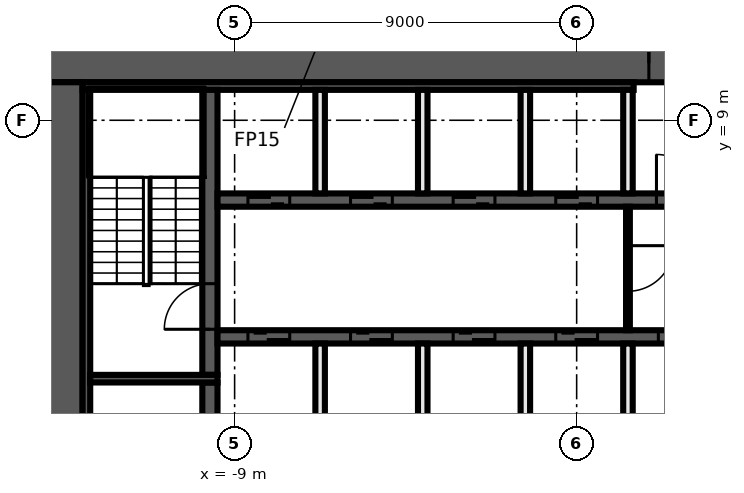
"""IFC4 building model, lengths in metres.
Left out: names, types, materials, properties, quantities, classifications, styles, units other than length and angle.
Written with IfcOpenShell. Run it as: python <this file> out.ifc"""

import sys

from ifc_helpers import new_model, si_unit, direction, frame, frame_2d, origin, place, context, subcontext, project, spatial, rectangle, extrude, element, fill, save


model = new_model("IFC4")
c1 = context("Model", 3, precision=1e-05, world=origin(), true_north=direction((0.0, 1.0)))
c2 = subcontext(c1, "Body", "Model", "MODEL_VIEW")
j1 = project(units=[si_unit("LENGTHUNIT", "METRE"), si_unit("PLANEANGLEUNIT", "RADIAN")], contexts=[c1])
p1 = place(None, origin())
s1 = spatial("IfcSite", under=j1, at=p1, CompositionType="ELEMENT")
p2 = place(p1, origin())
s2 = spatial("IfcBuilding", under=s1, at=p2, CompositionType="ELEMENT")
p3 = place(p2, frame((0.0, 0.0, 113.7)))
s3 = spatial("IfcBuildingStorey", under=s2, at=p3, CompositionType="ELEMENT", Elevation=113.7)
p4 = place(p3, frame((-14.0, 10.5, 0.0), z_axis=(0.0, 0.0, 1.0), x_axis=(1.0, 0.0, 0.0)))
e1 = element("IfcWall", 1, at=p4, inside=s3, PredefinedType="SHEAR", context=c2, shape_type="SweptSolid", body=[
    extrude(rectangle(XDim=28.0, YDim=1.0, at=frame_2d((14.0, 0.0))), origin(), (0.0, 0.0, 1.0), 3.3),
])
p5 = place(p4, frame((15.9, 0.0, 0.0)))
e2 = element("IfcOpeningElement", 2, at=p5, cuts=e1, PredefinedType="OPENING", context=c2, shape_type="SweptSolid", body=[
    extrude(rectangle(XDim=1.6, YDim=2.1, at=frame_2d((0.8, 1.05))), frame((0.0, 0.51, 0.0), z_axis=(0.0, -1.0, 0.0), x_axis=(1.0, 0.0, 0.0)), (0.0, 0.0, 1.0), 1.02),
])
p6 = place(p3, frame((-13.5, -10.0, 0.0), z_axis=(0.0, 0.0, 1.0), x_axis=(0.0, 1.0, 0.0)))
e3 = element("IfcWall", 3, at=p6, inside=s3, PredefinedType="SHEAR", context=c2, shape_type="SweptSolid", body=[
    extrude(rectangle(XDim=20.0, YDim=1.0, at=frame_2d((10.0, 0.0))), origin(), (0.0, 0.0, 1.0), 3.3),
])
p7 = place(p3, frame((-13.0, 9.9, 0.0), z_axis=(0.0, 0.0, 1.0), x_axis=(1.0, 0.0, 0.0)))
e4 = element("IfcWall", 4, at=p7, inside=s3, PredefinedType="SHEAR", context=c2, shape_type="SweptSolid", body=[
    extrude(rectangle(XDim=14.5, YDim=0.2, at=frame_2d((7.25, 0.0))), origin(), (0.0, 0.0, 1.0), 3.3),
])
p8 = place(p3, frame((-12.9, -9.8, 0.0), z_axis=(0.0, 0.0, 1.0), x_axis=(0.0, 1.0, 0.0)))
e5 = element("IfcWall", 5, at=p8, inside=s3, PredefinedType="SHEAR", context=c2, shape_type="SweptSolid", body=[
    extrude(rectangle(XDim=19.6, YDim=0.2, at=frame_2d((9.8, 0.0))), origin(), (0.0, 0.0, 1.0), 3.3),
])
p9 = place(p3, frame((-9.65, -2.1, 0.0), z_axis=(0.0, 0.0, 1.0), x_axis=(0.0, 1.0, 0.0)))
e6 = element("IfcWall", 6, at=p9, inside=s3, PredefinedType="SHEAR", context=c2, shape_type="SweptSolid", body=[
    extrude(rectangle(XDim=4.2, YDim=0.4, at=frame_2d((2.1, 0.0))), origin(), (0.0, 0.0, 1.0), 3.3),
])
p10 = place(p3, frame((-9.65, 2.3, 0.0), z_axis=(0.0, 0.0, 1.0), x_axis=(0.0, 1.0, 0.0)))
e7 = element("IfcWall", 7, at=p10, inside=s3, PredefinedType="SHEAR", context=c2, shape_type="SweptSolid", body=[
    extrude(rectangle(XDim=7.5, YDim=0.4, at=frame_2d((3.75, 0.0))), origin(), (0.0, 0.0, 1.0), 3.3),
])
p11 = place(p10, frame((1.2, 0.0, 0.0)))
e8 = element("IfcOpeningElement", 8, at=p11, cuts=e7, PredefinedType="OPENING", context=c2, shape_type="SweptSolid", body=[
    extrude(rectangle(XDim=1.2, YDim=2.1, at=frame_2d((0.6, 1.05))), frame((0.0, 0.21, 0.0), z_axis=(0.0, -1.0, 0.0), x_axis=(1.0, 0.0, 0.0)), (0.0, 0.0, 1.0), 0.42),
])
p12 = place(p3, frame((-9.45, 2.2, 0.0), z_axis=(0.0, 0.0, 1.0), x_axis=(-1.0, 0.0, 0.0)))
e9 = element("IfcWall", 9, at=p12, inside=s3, PredefinedType="SHEAR", context=c2, shape_type="SweptSolid", body=[
    extrude(rectangle(XDim=3.35, YDim=0.2, at=frame_2d((1.675, 0.0))), origin(), (0.0, 0.0, 1.0), 3.3),
])
p13 = place(p3, frame((-9.45, 6.9, 0.0), z_axis=(0.0, 0.0, 1.0), x_axis=(1.0, 0.0, 0.0)))
e10 = element("IfcWall", 10, at=p13, inside=s3, PredefinedType="SHEAR", context=c2, shape_type="SweptSolid", body=[
    extrude(rectangle(XDim=18.9, YDim=0.35, at=frame_2d((9.45, 0.0))), origin(), (0.0, 0.0, 1.0), 3.3),
])
p14 = place(p13, frame((0.8, 0.0, 0.0)))
e11 = element("IfcOpeningElement", 11, at=p14, cuts=e10, PredefinedType="OPENING", context=c2, shape_type="SweptSolid", body=[
    extrude(rectangle(XDim=1.1, YDim=2.1, at=frame_2d((0.55, 1.05))), frame((0.0, 0.185, 0.0), z_axis=(0.0, -1.0, 0.0), x_axis=(1.0, 0.0, 0.0)), (0.0, 0.0, 1.0), 0.37),
])
p15 = place(p13, frame((3.5, 0.0, 0.0)))
e12 = element("IfcOpeningElement", 12, at=p15, cuts=e10, PredefinedType="OPENING", context=c2, shape_type="SweptSolid", body=[
    extrude(rectangle(XDim=1.1, YDim=2.1, at=frame_2d((0.55, 1.05))), frame((0.0, 0.185, 0.0), z_axis=(0.0, -1.0, 0.0), x_axis=(1.0, 0.0, 0.0)), (0.0, 0.0, 1.0), 0.37),
])
p16 = place(p13, frame((6.2, 0.0, 0.0)))
e13 = element("IfcOpeningElement", 13, at=p16, cuts=e10, PredefinedType="OPENING", context=c2, shape_type="SweptSolid", body=[
    extrude(rectangle(XDim=1.1, YDim=2.1, at=frame_2d((0.55, 1.05))), frame((0.0, 0.185, 0.0), z_axis=(0.0, -1.0, 0.0), x_axis=(1.0, 0.0, 0.0)), (0.0, 0.0, 1.0), 0.37),
])
p17 = place(p13, frame((8.9, 0.0, 0.0)))
e14 = element("IfcOpeningElement", 14, at=p17, cuts=e10, PredefinedType="OPENING", context=c2, shape_type="SweptSolid", body=[
    extrude(rectangle(XDim=1.1, YDim=2.1, at=frame_2d((0.55, 1.05))), frame((0.0, 0.185, 0.0), z_axis=(0.0, -1.0, 0.0), x_axis=(1.0, 0.0, 0.0)), (0.0, 0.0, 1.0), 0.37),
])
p18 = place(p13, frame((11.55, 0.0, 0.0)))
e15 = element("IfcOpeningElement", 15, at=p18, cuts=e10, PredefinedType="OPENING", context=c2, shape_type="SweptSolid", body=[
    extrude(rectangle(XDim=1.2, YDim=2.1, at=frame_2d((0.6, 1.05))), frame((0.0, 0.185, 0.0), z_axis=(0.0, -1.0, 0.0), x_axis=(1.0, 0.0, 0.0)), (0.0, 0.0, 1.0), 0.37),
])
p19 = place(p13, frame((14.3, 0.0, 0.0)))
e16 = element("IfcOpeningElement", 16, at=p19, cuts=e10, PredefinedType="OPENING", context=c2, shape_type="SweptSolid", body=[
    extrude(rectangle(XDim=1.1, YDim=2.1, at=frame_2d((0.55, 1.05))), frame((0.0, 0.185, 0.0), z_axis=(0.0, -1.0, 0.0), x_axis=(1.0, 0.0, 0.0)), (0.0, 0.0, 1.0), 0.37),
])
p20 = place(p13, frame((17.0, 0.0, 0.0)))
e17 = element("IfcOpeningElement", 17, at=p20, cuts=e10, PredefinedType="OPENING", context=c2, shape_type="SweptSolid", body=[
    extrude(rectangle(XDim=1.1, YDim=2.1, at=frame_2d((0.55, 1.05))), frame((0.0, 0.185, 0.0), z_axis=(0.0, -1.0, 0.0), x_axis=(1.0, 0.0, 0.0)), (0.0, 0.0, 1.0), 0.37),
])
p21 = place(p3, frame((9.45, 3.3, 0.0), z_axis=(0.0, 0.0, 1.0), x_axis=(-1.0, 0.0, 0.0)))
e18 = element("IfcWall", 18, at=p21, inside=s3, PredefinedType="SHEAR", context=c2, shape_type="SweptSolid", body=[
    extrude(rectangle(XDim=18.9, YDim=0.35, at=frame_2d((9.45, 0.0))), origin(), (0.0, 0.0, 1.0), 3.3),
])
p22 = place(p21, frame((17.0, 0.0, 0.0)))
e19 = element("IfcOpeningElement", 19, at=p22, cuts=e18, PredefinedType="OPENING", context=c2, shape_type="SweptSolid", body=[
    extrude(rectangle(XDim=1.1, YDim=2.1, at=frame_2d((0.55, 1.05))), frame((0.0, 0.185, 0.0), z_axis=(0.0, -1.0, 0.0), x_axis=(1.0, 0.0, 0.0)), (0.0, 0.0, 1.0), 0.37),
])
p23 = place(p21, frame((14.3, 0.0, 0.0)))
e20 = element("IfcOpeningElement", 20, at=p23, cuts=e18, PredefinedType="OPENING", context=c2, shape_type="SweptSolid", body=[
    extrude(rectangle(XDim=1.1, YDim=2.1, at=frame_2d((0.55, 1.05))), frame((0.0, 0.185, 0.0), z_axis=(0.0, -1.0, 0.0), x_axis=(1.0, 0.0, 0.0)), (0.0, 0.0, 1.0), 0.37),
])
p24 = place(p21, frame((11.6, 0.0, 0.0)))
e21 = element("IfcOpeningElement", 21, at=p24, cuts=e18, PredefinedType="OPENING", context=c2, shape_type="SweptSolid", body=[
    extrude(rectangle(XDim=1.1, YDim=2.1, at=frame_2d((0.55, 1.05))), frame((0.0, 0.185, 0.0), z_axis=(0.0, -1.0, 0.0), x_axis=(1.0, 0.0, 0.0)), (0.0, 0.0, 1.0), 0.37),
])
p25 = place(p21, frame((8.9, 0.0, 0.0)))
e22 = element("IfcOpeningElement", 22, at=p25, cuts=e18, PredefinedType="OPENING", context=c2, shape_type="SweptSolid", body=[
    extrude(rectangle(XDim=1.1, YDim=2.1, at=frame_2d((0.55, 1.05))), frame((0.0, 0.185, 0.0), z_axis=(0.0, -1.0, 0.0), x_axis=(1.0, 0.0, 0.0)), (0.0, 0.0, 1.0), 0.37),
])
p26 = place(p21, frame((6.2, 0.0, 0.0)))
e23 = element("IfcOpeningElement", 23, at=p26, cuts=e18, PredefinedType="OPENING", context=c2, shape_type="SweptSolid", body=[
    extrude(rectangle(XDim=1.1, YDim=2.1, at=frame_2d((0.55, 1.05))), frame((0.0, 0.185, 0.0), z_axis=(0.0, -1.0, 0.0), x_axis=(1.0, 0.0, 0.0)), (0.0, 0.0, 1.0), 0.37),
])
p27 = place(p21, frame((3.5, 0.0, 0.0)))
e24 = element("IfcOpeningElement", 24, at=p27, cuts=e18, PredefinedType="OPENING", context=c2, shape_type="SweptSolid", body=[
    extrude(rectangle(XDim=1.1, YDim=2.1, at=frame_2d((0.55, 1.05))), frame((0.0, 0.185, 0.0), z_axis=(0.0, -1.0, 0.0), x_axis=(1.0, 0.0, 0.0)), (0.0, 0.0, 1.0), 0.37),
])
p28 = place(p21, frame((0.9, 0.0, 0.0)))
e25 = element("IfcOpeningElement", 25, at=p28, cuts=e18, PredefinedType="OPENING", context=c2, shape_type="SweptSolid", body=[
    extrude(rectangle(XDim=0.9, YDim=2.1, at=frame_2d((0.45, 1.05))), frame((0.0, 0.185, 0.0), z_axis=(0.0, -1.0, 0.0), x_axis=(1.0, 0.0, 0.0)), (0.0, 0.0, 1.0), 0.37),
])
p29 = place(p3, frame((1.35, 6.725, 0.0), z_axis=(0.0, 0.0, 1.0), x_axis=(0.0, -1.0, 0.0)))
e26 = element("IfcWall", 26, at=p29, inside=s3, PredefinedType="PARTITIONING", context=c2, shape_type="SweptSolid", body=[
    extrude(rectangle(XDim=3.25, YDim=0.1, at=frame_2d((1.625, 0.0))), origin(), (0.0, 0.0, 1.0), 3.3),
])
p30 = place(p29, frame((1.025, 0.0, 0.0)))
e27 = element("IfcOpeningElement", 27, at=p30, cuts=e26, PredefinedType="OPENING", context=c2, shape_type="SweptSolid", body=[
    extrude(rectangle(XDim=1.2, YDim=2.1, at=frame_2d((0.6, 1.05))), frame((0.0, 0.06, 0.0), z_axis=(0.0, -1.0, 0.0), x_axis=(1.0, 0.0, 0.0)), (0.0, 0.0, 1.0), 0.12),
])
for number, where, z_axis, x_axis in (
    (28, (1.35, 0.4, 0.0), (0.0, 0.0, 1.0), (0.0, 1.0, 0.0)),
    (29, (1.35, 7.075, 0.0), (0.0, 0.0, 1.0), (0.0, 1.0, 0.0)),
    (30, (-1.35, 0.4, 0.0), (0.0, 0.0, 1.0), (0.0, 1.0, 0.0)),
    (31, (-1.35, 7.075, 0.0), (0.0, 0.0, 1.0), (0.0, 1.0, 0.0)),
    (32, (-4.05, 0.4, 0.0), (0.0, 0.0, 1.0), (0.0, 1.0, 0.0)),
    (33, (-4.05, 7.075, 0.0), (0.0, 0.0, 1.0), (0.0, 1.0, 0.0)),
    (34, (-6.75, 0.4, 0.0), (0.0, 0.0, 1.0), (0.0, 1.0, 0.0)),
    (35, (-6.75, 7.075, 0.0), (0.0, 0.0, 1.0), (0.0, 1.0, 0.0)),
):
    element("IfcWall", number, at=place(p3, frame(where, z_axis=z_axis, x_axis=x_axis)), inside=s3, PredefinedType="SOLIDWALL", context=c2, shape_type="SweptSolid", body=[
        extrude(rectangle(XDim=2.725, YDim=0.25, at=frame_2d((1.363, 0.0))), origin(), (0.0, 0.0, 1.0), 3.3),
    ])
p31 = place(p14, origin())
e36 = element("IfcDoor", 36, at=p31, inside=s3, OperationType="DOUBLE_DOOR_SLIDING", PredefinedType="DOOR", context=c2, shape_type="SweptSolid", body=[
    extrude(rectangle(XDim=1.1, YDim=2.1, at=frame_2d((0.55, 1.05))), frame((0.0, 0.025, 0.0), z_axis=(0.0, -1.0, 0.0), x_axis=(1.0, 0.0, 0.0)), (0.0, 0.0, 1.0), 0.05),
])
fill(e11, e36)
p32 = place(p15, origin())
e37 = element("IfcDoor", 37, at=p32, inside=s3, OperationType="DOUBLE_DOOR_SLIDING", PredefinedType="DOOR", context=c2, shape_type="SweptSolid", body=[
    extrude(rectangle(XDim=1.1, YDim=2.1, at=frame_2d((0.55, 1.05))), frame((0.0, 0.025, 0.0), z_axis=(0.0, -1.0, 0.0), x_axis=(1.0, 0.0, 0.0)), (0.0, 0.0, 1.0), 0.05),
])
fill(e12, e37)
p33 = place(p16, origin())
e38 = element("IfcDoor", 38, at=p33, inside=s3, OperationType="DOUBLE_DOOR_SLIDING", PredefinedType="DOOR", context=c2, shape_type="SweptSolid", body=[
    extrude(rectangle(XDim=1.1, YDim=2.1, at=frame_2d((0.55, 1.05))), frame((0.0, 0.025, 0.0), z_axis=(0.0, -1.0, 0.0), x_axis=(1.0, 0.0, 0.0)), (0.0, 0.0, 1.0), 0.05),
])
fill(e13, e38)
p34 = place(p17, origin())
e39 = element("IfcDoor", 39, at=p34, inside=s3, OperationType="DOUBLE_DOOR_SLIDING", PredefinedType="DOOR", context=c2, shape_type="SweptSolid", body=[
    extrude(rectangle(XDim=1.1, YDim=2.1, at=frame_2d((0.55, 1.05))), frame((0.0, 0.025, 0.0), z_axis=(0.0, -1.0, 0.0), x_axis=(1.0, 0.0, 0.0)), (0.0, 0.0, 1.0), 0.05),
])
fill(e14, e39)
p35 = place(p5, origin())
e40 = element("IfcDoor", 40, at=p35, inside=s3, OperationType="DOUBLE_DOOR_SINGLE_SWING", PredefinedType="DOOR", context=c2, shape_type="SweptSolid", body=[
    extrude(rectangle(XDim=1.6, YDim=2.1, at=frame_2d((0.8, 1.05))), frame((0.0, 0.025, 0.0), z_axis=(0.0, -1.0, 0.0), x_axis=(1.0, 0.0, 0.0)), (0.0, 0.0, 1.0), 0.05),
])
fill(e2, e40)
p36 = place(p18, origin())
e41 = element("IfcDoor", 41, at=p36, inside=s3, OperationType="SINGLE_SWING_LEFT", PredefinedType="DOOR", context=c2, shape_type="SweptSolid", body=[
    extrude(rectangle(XDim=1.2, YDim=2.1, at=frame_2d((0.6, 1.05))), frame((0.0, 0.025, 0.0), z_axis=(0.0, -1.0, 0.0), x_axis=(1.0, 0.0, 0.0)), (0.0, 0.0, 1.0), 0.05),
])
fill(e15, e41)
p37 = place(p22, origin())
e42 = element("IfcDoor", 42, at=p37, inside=s3, OperationType="DOUBLE_DOOR_SLIDING", PredefinedType="DOOR", context=c2, shape_type="SweptSolid", body=[
    extrude(rectangle(XDim=1.1, YDim=2.1, at=frame_2d((0.55, 1.05))), frame((0.0, 0.025, 0.0), z_axis=(0.0, -1.0, 0.0), x_axis=(1.0, 0.0, 0.0)), (0.0, 0.0, 1.0), 0.05),
])
fill(e19, e42)
p38 = place(p23, origin())
e43 = element("IfcDoor", 43, at=p38, inside=s3, OperationType="DOUBLE_DOOR_SLIDING", PredefinedType="DOOR", context=c2, shape_type="SweptSolid", body=[
    extrude(rectangle(XDim=1.1, YDim=2.1, at=frame_2d((0.55, 1.05))), frame((0.0, 0.025, 0.0), z_axis=(0.0, -1.0, 0.0), x_axis=(1.0, 0.0, 0.0)), (0.0, 0.0, 1.0), 0.05),
])
fill(e20, e43)
p39 = place(p24, origin())
e44 = element("IfcDoor", 44, at=p39, inside=s3, OperationType="DOUBLE_DOOR_SLIDING", PredefinedType="DOOR", context=c2, shape_type="SweptSolid", body=[
    extrude(rectangle(XDim=1.1, YDim=2.1, at=frame_2d((0.55, 1.05))), frame((0.0, 0.025, 0.0), z_axis=(0.0, -1.0, 0.0), x_axis=(1.0, 0.0, 0.0)), (0.0, 0.0, 1.0), 0.05),
])
fill(e21, e44)
p40 = place(p25, origin())
e45 = element("IfcDoor", 45, at=p40, inside=s3, OperationType="DOUBLE_DOOR_SLIDING", PredefinedType="DOOR", context=c2, shape_type="SweptSolid", body=[
    extrude(rectangle(XDim=1.1, YDim=2.1, at=frame_2d((0.55, 1.05))), frame((0.0, 0.025, 0.0), z_axis=(0.0, -1.0, 0.0), x_axis=(1.0, 0.0, 0.0)), (0.0, 0.0, 1.0), 0.05),
])
fill(e22, e45)
p41 = place(p26, origin())
e46 = element("IfcDoor", 46, at=p41, inside=s3, OperationType="DOUBLE_DOOR_SLIDING", PredefinedType="DOOR", context=c2, shape_type="SweptSolid", body=[
    extrude(rectangle(XDim=1.1, YDim=2.1, at=frame_2d((0.55, 1.05))), frame((0.0, 0.025, 0.0), z_axis=(0.0, -1.0, 0.0), x_axis=(1.0, 0.0, 0.0)), (0.0, 0.0, 1.0), 0.05),
])
fill(e23, e46)
p42 = place(p11, origin())
e47 = element("IfcDoor", 47, at=p42, inside=s3, OperationType="SINGLE_SWING_RIGHT", PredefinedType="DOOR", context=c2, shape_type="SweptSolid", body=[
    extrude(rectangle(XDim=1.2, YDim=2.1, at=frame_2d((0.6, 1.05))), frame((0.0, 0.025, 0.0), z_axis=(0.0, -1.0, 0.0), x_axis=(1.0, 0.0, 0.0)), (0.0, 0.0, 1.0), 0.05),
])
fill(e8, e47)
p43 = place(p30, origin())
e48 = element("IfcDoor", 48, at=p43, inside=s3, OperationType="SINGLE_SWING_LEFT", PredefinedType="DOOR", context=c2, shape_type="SweptSolid", body=[
    extrude(rectangle(XDim=1.2, YDim=2.1, at=frame_2d((0.6, 1.05))), frame((0.0, 0.025, 0.0), z_axis=(0.0, -1.0, 0.0), x_axis=(1.0, 0.0, 0.0)), (0.0, 0.0, 1.0), 0.05),
])
fill(e27, e48)
save(model, sys.argv[1])
